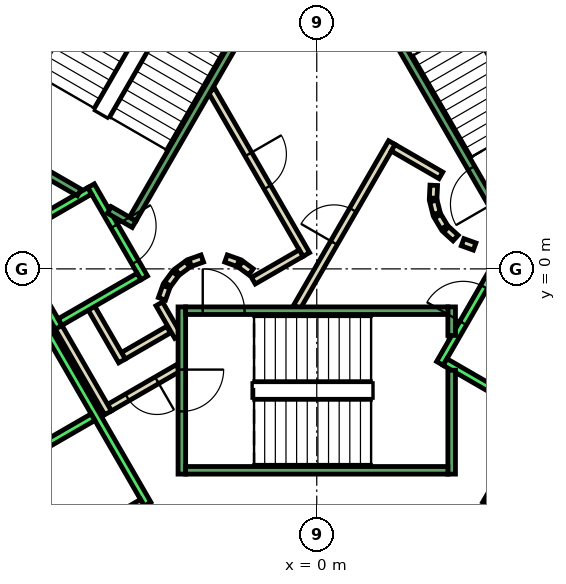
"""IFC4 building model, lengths in metres.
Left out: names, types, materials, properties, quantities, classifications, styles, units other than length and angle.
Written with IfcOpenShell. Run it as: python <this file> out.ifc"""

import sys

from ifc_helpers import new_model, si_unit, direction, frame, frame_2d, origin, place, context, subcontext, project, spatial, polyline, rectangle, outline, extrude, element, fill, save


model = new_model("IFC4")
c1 = context("Model", 3, precision=1e-05, world=origin(), true_north=direction((0.0, 1.0)))
c2 = subcontext(c1, "Body", "Model", "MODEL_VIEW")
j1 = project(units=[si_unit("LENGTHUNIT", "METRE"), si_unit("PLANEANGLEUNIT", "RADIAN")], contexts=[c1])
p1 = place(None, origin())
s1 = spatial("IfcSite", under=j1, at=p1, CompositionType="ELEMENT")
p2 = place(p1, origin())
s2 = spatial("IfcBuilding", under=s1, at=p2, CompositionType="ELEMENT")
p3 = place(p2, frame((0.0, 0.0, 167.6)))
s3 = spatial("IfcBuildingStorey", under=s2, at=p3, CompositionType="ELEMENT", Elevation=167.6)
p4 = place(p3, frame((0.0, 0.0, -0.4)))
e1 = element("IfcWall", 1, at=p4, inside=s3, PredefinedType="SHEAR", context=c2, shape_type="SweptSolid", body=[
    extrude(outline(polyline([(-12.267, 5.252), (-11.575, 4.852), (-6.466, 13.7), (-6.928, 14.5), (-12.267, 5.252)])), origin(), (0.0, 0.0, 1.0), 4.2),
])
p5 = place(p3, frame((0.0, 0.0, -0.4)))
e2 = element("IfcWall", 2, at=p5, inside=s3, PredefinedType="SHEAR", context=c2, shape_type="SweptSolid", body=[
    extrude(outline(polyline([(-13.856, 2.5), (-6.928, -9.5), (-6.466, -8.7), (-12.933, 2.5), (-13.856, 2.5)])), origin(), (0.0, 0.0, 1.0), 4.2),
])
p6 = place(p3, frame((-3.9, -1.599, 0.0), z_axis=(0.0, 0.0, 1.0), x_axis=(-0.865969445389, -0.500096910261, 0.0)))
e3 = element("IfcWall", 3, at=p6, inside=s3, PredefinedType="PARTITIONING", context=c2, shape_type="SweptSolid", body=[
    extrude(rectangle(XDim=1.373, YDim=0.2, at=frame_2d((0.687, 0.0))), origin(), (0.0, 0.0, 1.0), 3.8),
])
p7 = place(p3, frame((-5.126, -2.422, 0.0), z_axis=(0.0, 0.0, 1.0), x_axis=(-0.500062241894, 0.865989465428, 0.0)))
e4 = element("IfcWall", 4, at=p7, inside=s3, PredefinedType="PARTITIONING", context=c2, shape_type="SweptSolid", body=[
    extrude(rectangle(XDim=1.7, YDim=0.2, at=frame_2d((0.85, 0.0))), origin(), (0.0, 0.0, 1.0), 3.8),
])
p8 = place(p3, frame((-3.65, -2.61, 0.0), z_axis=(0.0, 0.0, 1.0), x_axis=(-0.866072462134, -0.499918483688, 0.0)))
e5 = element("IfcWall", 5, at=p8, inside=s3, PredefinedType="PARTITIONING", context=c2, shape_type="SweptSolid", body=[
    extrude(rectangle(XDim=2.084, YDim=0.2, at=frame_2d((1.042, 0.0))), origin(), (0.0, 0.0, 1.0), 3.8),
])
p9 = place(p8, frame((0.642, 0.0, 0.0)))
e6 = element("IfcOpeningElement", 6, at=p9, cuts=e5, PredefinedType="OPENING", context=c2, shape_type="SweptSolid", body=[
    extrude(rectangle(XDim=0.9, YDim=2.1, at=frame_2d((0.45, 1.05))), frame((0.0, 0.11, 0.0), z_axis=(0.0, -1.0, 0.0), x_axis=(1.0, 0.0, 0.0)), (0.0, 0.0, 1.0), 0.22),
])
p10 = place(p3, frame((-5.492, -3.788, 0.0), z_axis=(0.0, 0.0, 1.0), x_axis=(-0.500008949224, 0.866020236886, 0.0)))
e7 = element("IfcWall", 7, at=p10, inside=s3, PredefinedType="PARTITIONING", context=c2, shape_type="SweptSolid", body=[
    extrude(rectangle(XDim=2.68, YDim=0.2, at=frame_2d((1.34, 0.0))), origin(), (0.0, 0.0, 1.0), 3.8),
])
p11 = place(p3, frame((-4.145, -0.92, 0.0), z_axis=(0.0, 0.0, 1.0), x_axis=(0.499743786207, -0.866173278362, 0.0)))
e8 = element("IfcWall", 8, at=p11, inside=s3, PredefinedType="PARTITIONING", context=c2, shape_type="SweptSolid", body=[
    extrude(rectangle(XDim=0.991, YDim=0.2, at=frame_2d((0.495, 0.0))), origin(), (0.0, 0.0, 1.0), 3.8),
])
p12 = place(p3, frame((-0.52, -1.0, 0.0), z_axis=(0.0, 0.0, 1.0), x_axis=(0.50011622646, 0.865958290007, 0.0)))
e9 = element("IfcWall", 9, at=p12, inside=s3, PredefinedType="PARTITIONING", context=c2, shape_type="SweptSolid", body=[
    extrude(rectangle(XDim=4.991, YDim=0.2, at=frame_2d((2.496, 0.0))), origin(), (0.0, 0.0, 1.0), 3.8),
])
p13 = place(p12, frame((1.945, 0.0, 0.0)))
e10 = element("IfcOpeningElement", 10, at=p13, cuts=e9, PredefinedType="OPENING", context=c2, shape_type="SweptSolid", body=[
    extrude(rectangle(XDim=1.0, YDim=2.1, at=frame_2d((0.5, 1.05))), frame((0.0, 0.11, 0.0), z_axis=(0.0, -1.0, 0.0), x_axis=(1.0, 0.0, 0.0)), (0.0, 0.0, 1.0), 0.22),
])
p14 = place(p3, frame((2.012, 3.186, 0.0), z_axis=(0.0, 0.0, 1.0), x_axis=(0.865891012941, -0.500232699559, 0.0)))
e11 = element("IfcWall", 11, at=p14, inside=s3, PredefinedType="PARTITIONING", context=c2, shape_type="SweptSolid", body=[
    extrude(rectangle(XDim=1.449, YDim=0.2, at=frame_2d((0.725, 0.0))), origin(), (0.0, 0.0, 1.0), 3.8),
])
p15 = place(p3, frame((3.079, 2.199, 0.0), z_axis=(0.0, 0.0, 1.0), x_axis=(-0.047771483479, -0.998858290933, 0.0)))
e12 = element("IfcWall", 12, at=p15, inside=s3, PredefinedType="PARTITIONING", context=c2, shape_type="SweptSolid", body=[
    extrude(rectangle(XDim=0.337, YDim=0.2, at=frame_2d((0.169, 0.0))), origin(), (0.0, 0.0, 1.0), 3.8),
])
p16 = place(p3, frame((3.07, 1.786, 0.0), z_axis=(0.0, 0.0, 1.0), x_axis=(0.242705583207, -0.970099994784, 0.0)))
e13 = element("IfcWall", 13, at=p16, inside=s3, PredefinedType="PARTITIONING", context=c2, shape_type="SweptSolid", body=[
    extrude(rectangle(XDim=0.338, YDim=0.2, at=frame_2d((0.169, 0.0))), origin(), (0.0, 0.0, 1.0), 3.8),
])
for number, where, z_axis, x_axis in (
    (14, (3.182, 1.388, 0.0), (0.0, 0.0, 1.0), (0.512, -0.859, 0.0)),
    (15, (3.404, 1.039, 0.0), (0.0, 0.0, 1.0), (0.74, -0.672, 0.0)),
):
    element("IfcWall", number, at=place(p3, frame(where, z_axis=z_axis, x_axis=x_axis)), inside=s3, PredefinedType="PARTITIONING", context=c2, shape_type="SweptSolid", body=[
        extrude(rectangle(XDim=0.338, YDim=0.2, at=frame_2d((0.169, 0.0))), origin(), (0.0, 0.0, 1.0), 3.8),
    ])
p17 = place(p3, frame((3.838, 0.702, 0.0), z_axis=(0.0, 0.0, 1.0), x_axis=(0.941035081519, -0.338308993895, 0.0)))
e16 = element("IfcWall", 16, at=p17, inside=s3, PredefinedType="PARTITIONING", context=c2, shape_type="SweptSolid", body=[
    extrude(rectangle(XDim=0.337, YDim=0.2, at=frame_2d((0.168, 0.0))), origin(), (0.0, 0.0, 1.0), 3.8),
])
p18 = place(p3, frame((-2.771, 4.7, 0.0), z_axis=(0.0, 0.0, 1.0), x_axis=(0.499969479948, -0.866043023828, 0.0)))
e17 = element("IfcWall", 17, at=p18, inside=s3, PredefinedType="PARTITIONING", context=c2, shape_type="SweptSolid", body=[
    extrude(rectangle(XDim=4.99, YDim=0.2, at=frame_2d((2.495, 0.0))), origin(), (0.0, 0.0, 1.0), 3.8),
])
p19 = place(p18, frame((1.945, 0.0, 0.0)))
e18 = element("IfcOpeningElement", 18, at=p19, cuts=e17, PredefinedType="OPENING", context=c2, shape_type="SweptSolid", body=[
    extrude(rectangle(XDim=1.0, YDim=2.1, at=frame_2d((0.5, 1.05))), frame((0.0, 0.11, 0.0), z_axis=(0.0, -1.0, 0.0), x_axis=(1.0, 0.0, 0.0)), (0.0, 0.0, 1.0), 0.22),
])
p20 = place(p3, frame((-0.412, 0.414, 0.0), z_axis=(0.0, 0.0, 1.0), x_axis=(-0.866017369001, -0.500013916395, 0.0)))
e19 = element("IfcWall", 19, at=p20, inside=s3, PredefinedType="PARTITIONING", context=c2, shape_type="SweptSolid", body=[
    extrude(rectangle(XDim=1.45, YDim=0.2, at=frame_2d((0.725, 0.0))), origin(), (0.0, 0.0, 1.0), 3.8),
])
p21 = place(p3, frame((-1.731, -0.077, 0.0), z_axis=(0.0, 0.0, 1.0), x_axis=(-0.804311165252, 0.594208338422, 0.0)))
e20 = element("IfcWall", 20, at=p21, inside=s3, PredefinedType="PARTITIONING", context=c2, shape_type="SweptSolid", body=[
    extrude(rectangle(XDim=0.338, YDim=0.2, at=frame_2d((0.169, 0.0))), origin(), (0.0, 0.0, 1.0), 3.8),
])
p22 = place(p3, frame((-2.07, 0.16, 0.0), z_axis=(0.0, 0.0, 1.0), x_axis=(-0.942199461132, 0.335052496547, 0.0)))
e21 = element("IfcWall", 21, at=p22, inside=s3, PredefinedType="PARTITIONING", context=c2, shape_type="SweptSolid", body=[
    extrude(rectangle(XDim=0.337, YDim=0.2, at=frame_2d((0.169, 0.0))), origin(), (0.0, 0.0, 1.0), 3.8),
])
p23 = place(p3, frame((-3.012, 0.273, 0.0), z_axis=(0.0, 0.0, 1.0), x_axis=(-0.942280615813, -0.334824194261, 0.0)))
e22 = element("IfcWall", 22, at=p23, inside=s3, PredefinedType="PARTITIONING", context=c2, shape_type="SweptSolid", body=[
    extrude(rectangle(XDim=0.338, YDim=0.2, at=frame_2d((0.169, 0.0))), origin(), (0.0, 0.0, 1.0), 3.8),
])
p24 = place(p3, frame((-3.397, 0.124, 0.0), z_axis=(0.0, 0.0, 1.0), x_axis=(-0.804311165252, -0.594208338422, 0.0)))
e23 = element("IfcWall", 23, at=p24, inside=s3, PredefinedType="PARTITIONING", context=c2, shape_type="SweptSolid", body=[
    extrude(rectangle(XDim=0.338, YDim=0.2, at=frame_2d((0.169, 0.0))), origin(), (0.0, 0.0, 1.0), 3.8),
])
p25 = place(p3, frame((-3.723, -0.131, 0.0), z_axis=(0.0, 0.0, 1.0), x_axis=(-0.594675113454, -0.803966112121, 0.0)))
e24 = element("IfcWall", 24, at=p25, inside=s3, PredefinedType="PARTITIONING", context=c2, shape_type="SweptSolid", body=[
    extrude(rectangle(XDim=0.338, YDim=0.2, at=frame_2d((0.169, 0.0))), origin(), (0.0, 0.0, 1.0), 3.8),
])
p26 = place(p3, frame((-3.96, -0.47, 0.0), z_axis=(0.0, 0.0, 1.0), x_axis=(-0.334824194261, -0.942280615813, 0.0)))
e25 = element("IfcWall", 25, at=p26, inside=s3, PredefinedType="PARTITIONING", context=c2, shape_type="SweptSolid", body=[
    extrude(rectangle(XDim=0.338, YDim=0.2, at=frame_2d((0.169, 0.0))), origin(), (0.0, 0.0, 1.0), 3.8),
])
p27 = place(p3, frame((-5.94, 2.188, 0.0), z_axis=(0.0, 0.0, 1.0), x_axis=(0.49994636267, -0.866056369097, 0.0)))
e26 = element("IfcWall", 26, at=p27, inside=s3, PredefinedType="STANDARD", context=c2, shape_type="SweptSolid", body=[
    extrude(rectangle(XDim=2.8, YDim=0.2, at=frame_2d((1.4, 0.0))), origin(), (0.0, 0.0, 1.0), 3.8),
])
p28 = place(p27, frame((1.225, 0.0, 0.0)))
e27 = element("IfcOpeningElement", 27, at=p28, cuts=e26, PredefinedType="OPENING", context=c2, shape_type="SweptSolid", body=[
    extrude(rectangle(XDim=1.1, YDim=2.1, at=frame_2d((0.55, 1.05))), frame((0.0, 0.11, 0.0), z_axis=(0.0, -1.0, 0.0), x_axis=(1.0, 0.0, 0.0)), (0.0, 0.0, 1.0), 0.22),
])
p29 = place(p3, frame((-8.192, 0.888, 0.0), z_axis=(0.0, 0.0, 1.0), x_axis=(0.49994636267, -0.866056369097, 0.0)))
e28 = element("IfcWall", 28, at=p29, inside=s3, PredefinedType="STANDARD", context=c2, shape_type="SweptSolid", body=[
    extrude(rectangle(XDim=2.8, YDim=0.2, at=frame_2d((1.4, 0.0))), origin(), (0.0, 0.0, 1.0), 3.8),
])
for number, where, z_axis, x_axis in (
    (29, (-5.977, 2.052, 0.0), (0.0, 0.0, 1.0), (-0.866, -0.5, 0.0)),
    (30, (-4.677, -0.2, 0.0), (0.0, 0.0, 1.0), (-0.866, -0.5, 0.0)),
):
    element("IfcWall", number, at=place(p3, frame(where, z_axis=z_axis, x_axis=x_axis)), inside=s3, PredefinedType="STANDARD", context=c2, shape_type="SweptSolid", body=[
        extrude(rectangle(XDim=2.399, YDim=0.2, at=frame_2d((1.2, 0.0))), origin(), (0.0, 0.0, 1.0), 3.8),
    ])
p30 = place(p3, frame((-9.751, 2.99, 0.0), z_axis=(0.0, 0.0, 1.0), x_axis=(0.50000090737, -0.866024879913, 0.0)))
e31 = element("IfcWall", 31, at=p30, inside=s3, PredefinedType="STANDARD", context=c2, shape_type="SweptSolid", body=[
    extrude(rectangle(XDim=10.6, YDim=0.2, at=frame_2d((5.3, 0.0))), origin(), (0.0, 0.0, 1.0), 3.8),
])
for number, where, z_axis, x_axis in (
    (32, (-5.888, -3.902, 0.0), (0.0, 0.0, 1.0), (-0.866, -0.5, 0.0)),
    (33, (-4.588, -6.153, 0.0), (0.0, 0.0, 1.0), (-0.866, -0.5, 0.0)),
):
    element("IfcWall", number, at=place(p3, frame(where, z_axis=z_axis, x_axis=x_axis)), inside=s3, PredefinedType="STANDARD", context=c2, shape_type="SweptSolid", body=[
        extrude(rectangle(XDim=2.5, YDim=0.2, at=frame_2d((1.25, 0.0))), origin(), (0.0, 0.0, 1.0), 3.8),
    ])
p31 = place(p3, frame((3.24, -2.488, 0.0), z_axis=(0.0, 0.0, 1.0), x_axis=(0.49994636267, 0.866056369097, 0.0)))
e34 = element("IfcWall", 34, at=p31, inside=s3, PredefinedType="STANDARD", context=c2, shape_type="SweptSolid", body=[
    extrude(rectangle(XDim=2.8, YDim=0.2, at=frame_2d((1.4, 0.0))), origin(), (0.0, 0.0, 1.0), 3.8),
])
p32 = place(p31, frame((1.225, 0.0, 0.0)))
e35 = element("IfcOpeningElement", 35, at=p32, cuts=e34, PredefinedType="OPENING", context=c2, shape_type="SweptSolid", body=[
    extrude(rectangle(XDim=1.1, YDim=2.1, at=frame_2d((0.55, 1.05))), frame((0.0, 0.11, 0.0), z_axis=(0.0, -1.0, 0.0), x_axis=(1.0, 0.0, 0.0)), (0.0, 0.0, 1.0), 0.22),
])
p33 = place(p3, frame((3.377, -2.452, 0.0), z_axis=(0.0, 0.0, 1.0), x_axis=(0.865955154139, -0.50012165622, 0.0)))
e36 = element("IfcWall", 36, at=p33, inside=s3, PredefinedType="STANDARD", context=c2, shape_type="SweptSolid", body=[
    extrude(rectangle(XDim=2.4, YDim=0.2, at=frame_2d((1.2, 0.0))), origin(), (0.0, 0.0, 1.0), 3.8),
])
p34 = place(p3, frame((4.451, -6.19, 0.0), z_axis=(0.0, 0.0, 1.0), x_axis=(0.50000090737, 0.866024879913, 0.0)))
e37 = element("IfcWall", 37, at=p34, inside=s3, PredefinedType="STANDARD", context=c2, shape_type="SweptSolid", body=[
    extrude(rectangle(XDim=10.6, YDim=0.2, at=frame_2d((5.3, 0.0))), origin(), (0.0, 0.0, 1.0), 3.8),
])
p35 = place(p3, frame((-3.55, -1.0, 0.0), z_axis=(0.0, 0.0, 1.0), x_axis=(0.0, -1.0, 0.0)))
e38 = element("IfcWall", 38, at=p35, inside=s3, PredefinedType="STANDARD", context=c2, shape_type="SweptSolid", body=[
    extrude(rectangle(XDim=4.4, YDim=0.2, at=frame_2d((2.2, 0.0))), origin(), (0.0, 0.0, 1.0), 3.8),
])
p36 = place(p35, frame((1.65, 0.0, 0.0)))
e39 = element("IfcOpeningElement", 39, at=p36, cuts=e38, PredefinedType="OPENING", context=c2, shape_type="SweptSolid", body=[
    extrude(rectangle(XDim=1.1, YDim=2.2, at=frame_2d((0.55, 1.1))), frame((0.0, 0.11, 0.0), z_axis=(0.0, -1.0, 0.0), x_axis=(1.0, 0.0, 0.0)), (0.0, 0.0, 1.0), 0.22),
])
p37 = place(p3, frame((3.55, -2.667, 0.0), z_axis=(0.0, 0.0, 1.0), x_axis=(0.0, -1.0, 0.0)))
e40 = element("IfcWall", 40, at=p37, inside=s3, PredefinedType="STANDARD", context=c2, shape_type="SweptSolid", body=[
    extrude(rectangle(XDim=2.733, YDim=0.2, at=frame_2d((1.366, 0.0))), origin(), (0.0, 0.0, 1.0), 3.8),
])
p38 = place(p3, frame((3.55, -1.0, 0.0), z_axis=(0.0, 0.0, 1.0), x_axis=(0.0, -1.0, 0.0)))
e41 = element("IfcWall", 41, at=p38, inside=s3, PredefinedType="STANDARD", context=c2, shape_type="SweptSolid", body=[
    extrude(rectangle(XDim=0.751, YDim=0.2, at=frame_2d((0.375, 0.0))), origin(), (0.0, 0.0, 1.0), 3.8),
])
p39 = place(p3, frame((-3.45, -1.1, 0.0), z_axis=(0.0, 0.0, 1.0), x_axis=(1.0, 0.0, 0.0)))
e42 = element("IfcWall", 42, at=p39, inside=s3, PredefinedType="STANDARD", context=c2, shape_type="SweptSolid", body=[
    extrude(rectangle(XDim=6.9, YDim=0.2, at=frame_2d((3.45, 0.0))), origin(), (0.0, 0.0, 1.0), 3.8),
])
p40 = place(p39, frame((0.45, 0.0, 0.0)))
e43 = element("IfcOpeningElement", 43, at=p40, cuts=e42, PredefinedType="OPENING", context=c2, shape_type="SweptSolid", body=[
    extrude(rectangle(XDim=1.1, YDim=2.2, at=frame_2d((0.55, 1.1))), frame((0.0, 0.11, 0.0), z_axis=(0.0, -1.0, 0.0), x_axis=(1.0, 0.0, 0.0)), (0.0, 0.0, 1.0), 0.22),
])
p41 = place(p3, frame((-3.45, -5.3, 0.0), z_axis=(0.0, 0.0, 1.0), x_axis=(1.0, 0.0, 0.0)))
e44 = element("IfcWall", 44, at=p41, inside=s3, PredefinedType="STANDARD", context=c2, shape_type="SweptSolid", body=[
    extrude(rectangle(XDim=6.9, YDim=0.2, at=frame_2d((3.45, 0.0))), origin(), (0.0, 0.0, 1.0), 3.8),
])
p42 = place(p3, frame((4.843, 1.312, 0.0), z_axis=(0.0, 0.0, 1.0), x_axis=(-0.499963383562, 0.866046543262, 0.0)))
e45 = element("IfcWall", 45, at=p42, inside=s3, PredefinedType="STANDARD", context=c2, shape_type="SweptSolid", body=[
    extrude(rectangle(XDim=6.9, YDim=0.2, at=frame_2d((3.45, 0.0))), origin(), (0.0, 0.0, 1.0), 3.8),
])
p43 = place(p42, frame((0.45, 0.0, 0.0)))
e46 = element("IfcOpeningElement", 46, at=p43, cuts=e45, PredefinedType="OPENING", context=c2, shape_type="SweptSolid", body=[
    extrude(rectangle(XDim=1.1, YDim=2.2, at=frame_2d((0.55, 1.1))), frame((0.0, 0.11, 0.0), z_axis=(0.0, -1.0, 0.0), x_axis=(1.0, 0.0, 0.0)), (0.0, 0.0, 1.0), 0.22),
])
p44 = place(p3, frame((-6.25, 2.01, 0.0), z_axis=(0.0, 0.0, 1.0), x_axis=(-0.86611865017, 0.499838457731, 0.0)))
e47 = element("IfcWall", 47, at=p44, inside=s3, PredefinedType="STANDARD", context=c2, shape_type="SweptSolid", body=[
    extrude(rectangle(XDim=2.733, YDim=0.2, at=frame_2d((1.366, 0.0))), origin(), (0.0, 0.0, 1.0), 3.8),
])
p45 = place(p3, frame((-4.806, 1.176, 0.0), z_axis=(0.0, 0.0, 1.0), x_axis=(-0.866558586415, 0.499075361355, 0.0)))
e48 = element("IfcWall", 48, at=p45, inside=s3, PredefinedType="STANDARD", context=c2, shape_type="SweptSolid", body=[
    extrude(rectangle(XDim=0.751, YDim=0.2, at=frame_2d((0.376, 0.0))), origin(), (0.0, 0.0, 1.0), 3.8),
])
p46 = place(p3, frame((-1.393, 7.288, 0.0), z_axis=(0.0, 0.0, 1.0), x_axis=(-0.499963383562, -0.866046543262, 0.0)))
e49 = element("IfcWall", 49, at=p46, inside=s3, PredefinedType="STANDARD", context=c2, shape_type="SweptSolid", body=[
    extrude(rectangle(XDim=6.9, YDim=0.2, at=frame_2d((3.45, 0.0))), origin(), (0.0, 0.0, 1.0), 3.8),
])
p47 = place(p46, frame((0.45, 0.0, 0.0)))
e50 = element("IfcOpeningElement", 50, at=p47, cuts=e49, PredefinedType="OPENING", context=c2, shape_type="SweptSolid", body=[
    extrude(rectangle(XDim=1.1, YDim=2.2, at=frame_2d((0.55, 1.1))), frame((0.0, 0.11, 0.0), z_axis=(0.0, -1.0, 0.0), x_axis=(1.0, 0.0, 0.0)), (0.0, 0.0, 1.0), 0.22),
])
p48 = place(p3, frame((-5.03, 9.388, 0.0), z_axis=(0.0, 0.0, 1.0), x_axis=(-0.499978703459, -0.866037698999, 0.0)))
e51 = element("IfcWall", 51, at=p48, inside=s3, PredefinedType="STANDARD", context=c2, shape_type="SweptSolid", body=[
    extrude(rectangle(XDim=6.9, YDim=0.2, at=frame_2d((3.45, 0.0))), origin(), (0.0, 0.0, 1.0), 3.8),
])
p49 = place(p13, origin())
e52 = element("IfcDoor", 52, at=p49, inside=s3, OperationType="SINGLE_SWING_LEFT", PredefinedType="DOOR", context=c2, shape_type="SweptSolid", body=[
    extrude(rectangle(XDim=1.0, YDim=2.1, at=frame_2d((0.5, 1.05))), frame((0.0, 0.025, 0.0), z_axis=(0.0, -1.0, 0.0), x_axis=(1.0, 0.0, 0.0)), (0.0, 0.0, 1.0), 0.05),
])
fill(e10, e52)
p50 = place(p19, origin())
e53 = element("IfcDoor", 53, at=p50, inside=s3, OperationType="SINGLE_SWING_RIGHT", PredefinedType="DOOR", context=c2, shape_type="SweptSolid", body=[
    extrude(rectangle(XDim=1.0, YDim=2.1, at=frame_2d((0.5, 1.05))), frame((0.0, 0.025, 0.0), z_axis=(0.0, -1.0, 0.0), x_axis=(1.0, 0.0, 0.0)), (0.0, 0.0, 1.0), 0.05),
])
fill(e18, e53)
p51 = place(p9, origin())
e54 = element("IfcDoor", 54, at=p51, inside=s3, OperationType="SINGLE_SWING_LEFT", PredefinedType="DOOR", context=c2, shape_type="SweptSolid", body=[
    extrude(rectangle(XDim=0.9, YDim=2.1, at=frame_2d((0.45, 1.05))), frame((0.0, 0.025, 0.0), z_axis=(0.0, -1.0, 0.0), x_axis=(1.0, 0.0, 0.0)), (0.0, 0.0, 1.0), 0.05),
])
fill(e6, e54)
p52 = place(p32, origin())
e55 = element("IfcDoor", 55, at=p52, inside=s3, OperationType="SLIDING_TO_LEFT", PredefinedType="DOOR", context=c2, shape_type="SweptSolid", body=[
    extrude(rectangle(XDim=1.1, YDim=2.1, at=frame_2d((0.55, 1.05))), frame((0.0, 0.025, 0.0), z_axis=(0.0, -1.0, 0.0), x_axis=(1.0, 0.0, 0.0)), (0.0, 0.0, 1.0), 0.05),
])
fill(e35, e55)
p53 = place(p28, origin())
e56 = element("IfcDoor", 56, at=p53, inside=s3, OperationType="SLIDING_TO_LEFT", PredefinedType="DOOR", context=c2, shape_type="SweptSolid", body=[
    extrude(rectangle(XDim=1.1, YDim=2.1, at=frame_2d((0.55, 1.05))), frame((0.0, 0.025, 0.0), z_axis=(0.0, -1.0, 0.0), x_axis=(1.0, 0.0, 0.0)), (0.0, 0.0, 1.0), 0.05),
])
fill(e27, e56)
p54 = place(p40, origin())
e57 = element("IfcDoor", 57, at=p54, inside=s3, OperationType="SINGLE_SWING_LEFT", PredefinedType="DOOR", context=c2, shape_type="SweptSolid", body=[
    extrude(rectangle(XDim=1.1, YDim=2.2, at=frame_2d((0.55, 1.1))), frame((0.0, 0.025, 0.0), z_axis=(0.0, -1.0, 0.0), x_axis=(1.0, 0.0, 0.0)), (0.0, 0.0, 1.0), 0.05),
])
fill(e43, e57)
p55 = place(p36, origin())
e58 = element("IfcDoor", 58, at=p55, inside=s3, OperationType="SINGLE_SWING_LEFT", PredefinedType="DOOR", context=c2, shape_type="SweptSolid", body=[
    extrude(rectangle(XDim=1.1, YDim=2.2, at=frame_2d((0.55, 1.1))), frame((0.0, 0.025, 0.0), z_axis=(0.0, -1.0, 0.0), x_axis=(1.0, 0.0, 0.0)), (0.0, 0.0, 1.0), 0.05),
])
fill(e39, e58)
p56 = place(p43, origin())
e59 = element("IfcDoor", 59, at=p56, inside=s3, OperationType="SINGLE_SWING_LEFT", PredefinedType="DOOR", context=c2, shape_type="SweptSolid", body=[
    extrude(rectangle(XDim=1.1, YDim=2.2, at=frame_2d((0.55, 1.1))), frame((0.0, 0.025, 0.0), z_axis=(0.0, -1.0, 0.0), x_axis=(1.0, 0.0, 0.0)), (0.0, 0.0, 1.0), 0.05),
])
fill(e46, e59)
save(model, sys.argv[1])
